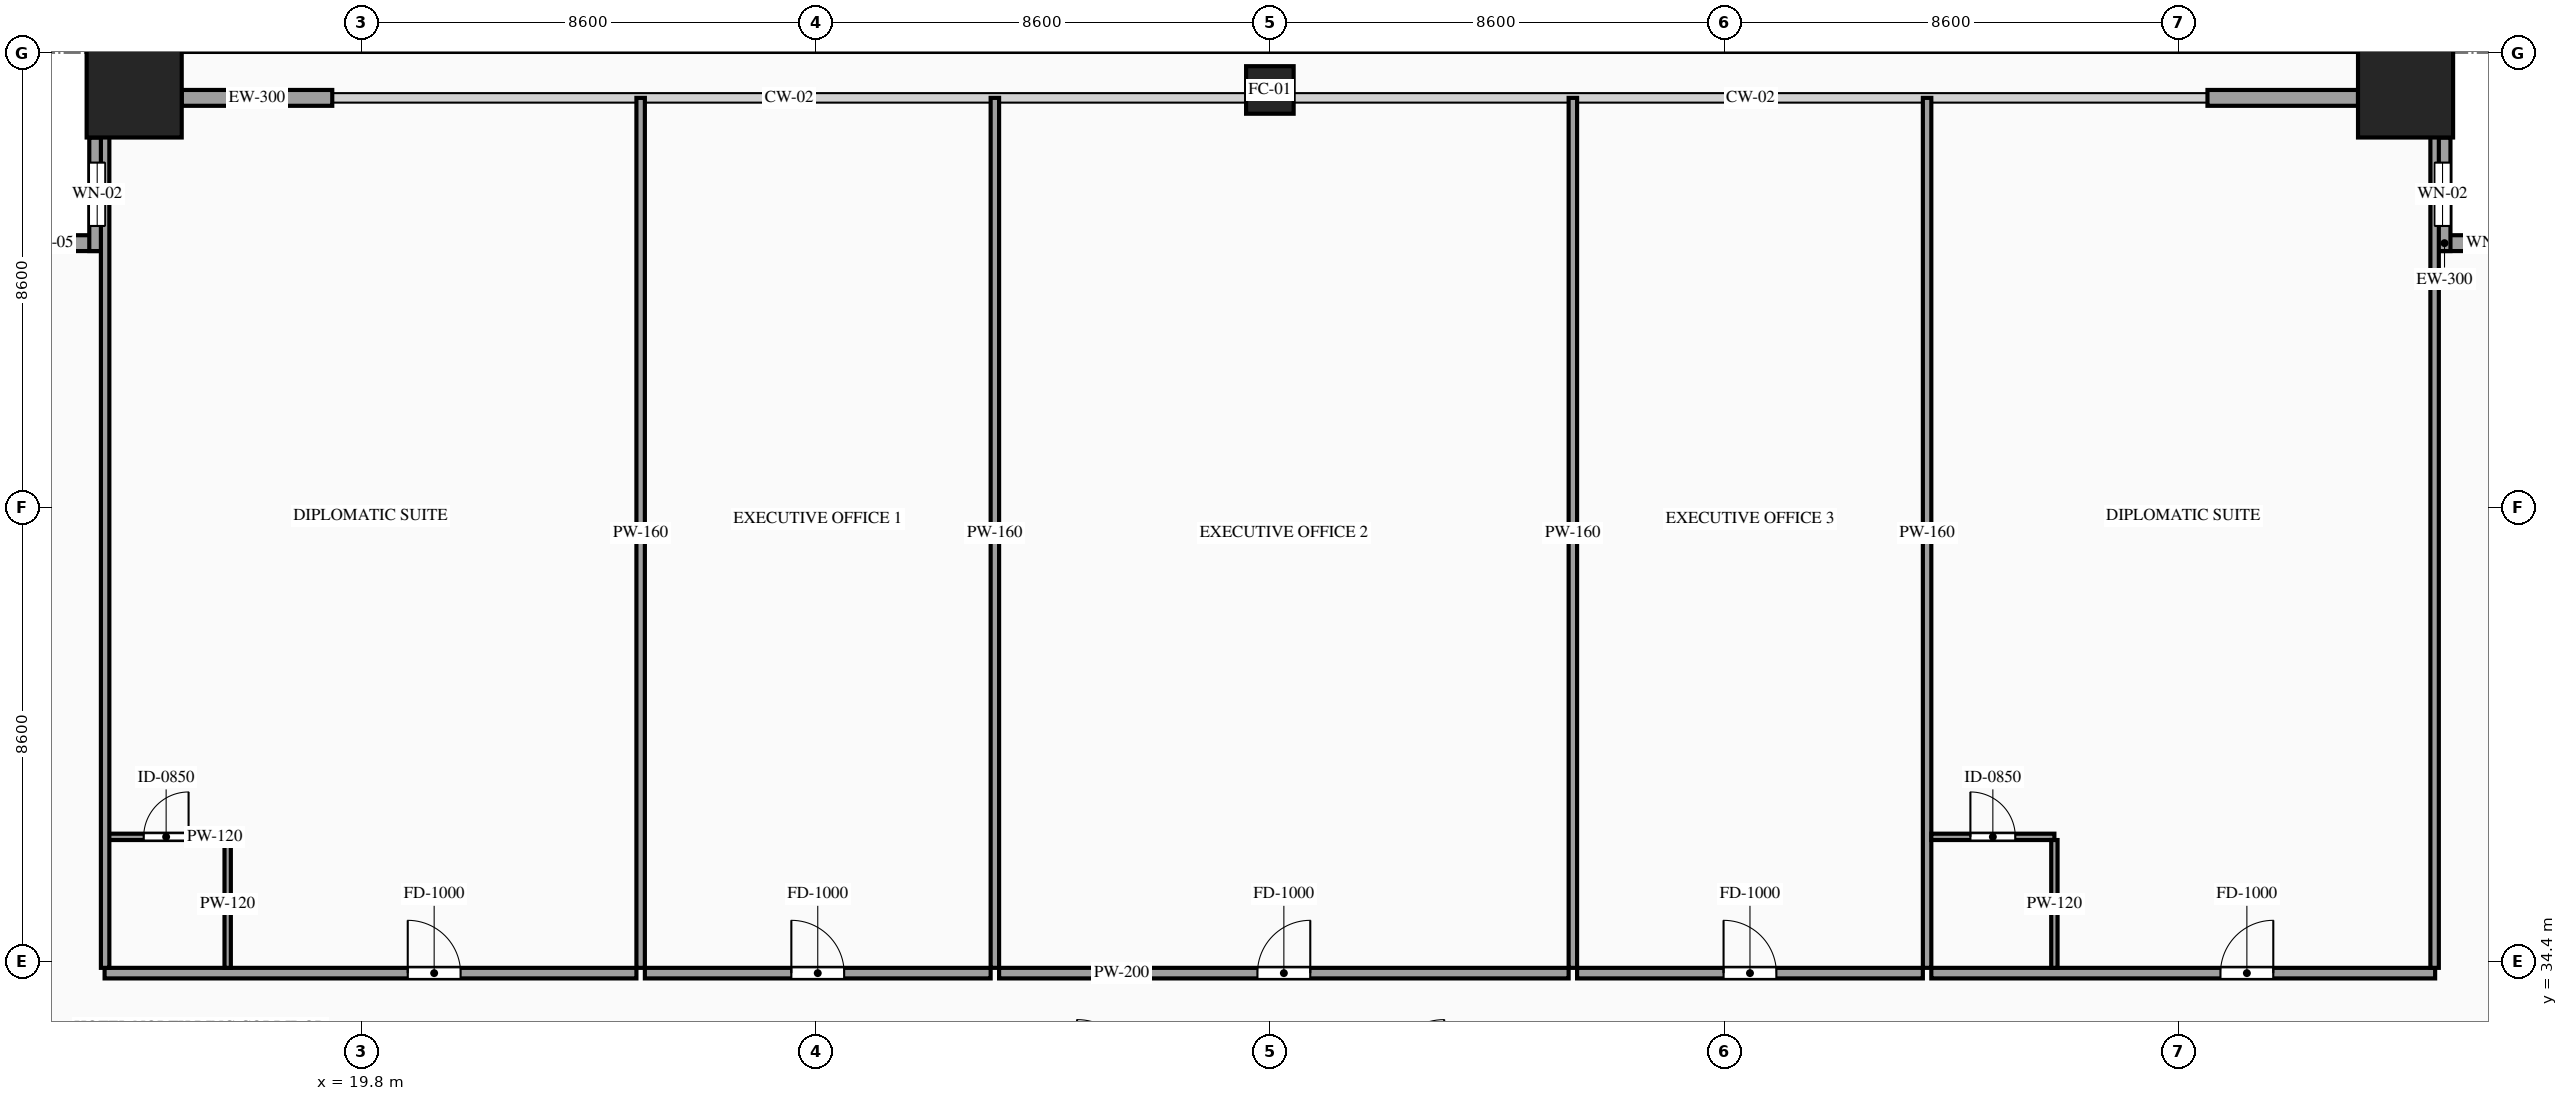
"""IFC4 building model, lengths in metres.
Left out: names, types, materials, properties, quantities, classifications, styles, units other than length and angle.
Written with IfcOpenShell. Run it as: python <this file> out.ifc"""

import sys

from ifc_helpers import new_model, si_unit, direction, frame, frame_2d, origin, origin_2d, place, context, subcontext, project, spatial, rectangle, hollow_rectangle, extrude, source, transform, mapped, element, fill, save


model = new_model("IFC4")
c1 = context("Model", 3, precision=1e-05, world=origin(), true_north=direction((0.0, 1.0)))
c2 = subcontext(c1, "Body", "Model", "MODEL_VIEW")
j1 = project(units=[si_unit("LENGTHUNIT", "METRE"), si_unit("PLANEANGLEUNIT", "RADIAN")], contexts=[c1])
p1 = place(None, origin())
s1 = spatial("IfcSite", under=j1, at=p1, CompositionType="ELEMENT")
p2 = place(p1, origin())
s2 = spatial("IfcBuilding", under=s1, at=p2, CompositionType="ELEMENT")
p3 = place(p2, frame((0.0, 0.0, 56.8)))
s3 = spatial("IfcBuildingStorey", under=s2, at=p3, CompositionType="ELEMENT", Elevation=56.8)
m1 = source(origin(), c2, "Body", "SweptSolid", [
    extrude(hollow_rectangle(XDim=1.8, YDim=1.8, WallThickness=0.08, at=origin_2d()), origin(), (0.0, 0.0, 1.0), 3.6),
])
p4 = place(p3, frame((15.5, 50.9, 0.0), z_axis=(0.0, 0.0, 1.0), x_axis=(1.0, 0.0, 0.0)))
e1 = element("IfcColumn", 1, at=p4, inside=s3, PredefinedType="COLUMN", context=c2, shape_type="MappedRepresentation", body=[
    mapped(m1, transform((0.0, 0.0, 0.0), scale=1.0)),
])
m2 = source(origin(), c2, "Body", "SweptSolid", [
    extrude(hollow_rectangle(XDim=0.9, YDim=0.9, WallThickness=0.042, at=origin_2d()), origin(), (0.0, 0.0, 1.0), 3.6),
])
p5 = place(p3, frame((37.0, 50.9, 0.0), z_axis=(0.0, 0.0, 1.0), x_axis=(1.0, 0.0, 0.0)))
e2 = element("IfcColumn", 2, at=p5, inside=s3, PredefinedType="COLUMN", context=c2, shape_type="MappedRepresentation", body=[
    mapped(m2, transform((0.0, 0.0, 0.0), scale=1.0)),
])
p6 = place(p3, frame((58.5, 50.9, 0.0), z_axis=(0.0, 0.0, 1.0), x_axis=(1.0, 0.0, 0.0)))
e3 = element("IfcColumn", 3, at=p6, inside=s3, PredefinedType="COLUMN", context=c2, shape_type="MappedRepresentation", body=[
    mapped(m1, transform((0.0, 0.0, 0.0), scale=1.0)),
])
p7 = place(p3, frame((14.95, 48.0, 0.0), z_axis=(0.0, 0.0, 1.0), x_axis=(-1.0, 0.0, 0.0)))
e4 = element("IfcWall", 4, at=p7, inside=s3, PredefinedType="SOLIDWALL", context=c2, shape_type="SweptSolid", body=[
    extrude(rectangle(XDim=2.15, YDim=0.3, at=frame_2d((1.075, 0.0))), origin(), (0.0, 0.0, 1.0), 3.38),
])
p8 = place(p7, frame((0.625, 0.0, 0.85)))
e5 = element("IfcOpeningElement", 5, at=p8, cuts=e4, PredefinedType="OPENING", context=c2, shape_type="SweptSolid", body=[
    extrude(rectangle(XDim=0.9, YDim=1.5, at=frame_2d((0.45, 0.75))), frame((0.0, 0.165, 0.0), z_axis=(0.0, -1.0, 0.0), x_axis=(1.0, 0.0, 0.0)), (0.0, 0.0, 1.0), 0.33),
])
p9 = place(p3, frame((14.8, 50.0, 0.0), z_axis=(0.0, 0.0, 1.0), x_axis=(0.0, -1.0, 0.0)))
e6 = element("IfcWall", 6, at=p9, inside=s3, PredefinedType="SOLIDWALL", context=c2, shape_type="SweptSolid", body=[
    extrude(rectangle(XDim=2.15, YDim=0.3, at=frame_2d((1.075, 0.0))), origin(), (0.0, 0.0, 1.0), 3.38),
])
p10 = place(p9, frame((0.475, 0.0, 0.85)))
e7 = element("IfcOpeningElement", 7, at=p10, cuts=e6, PredefinedType="OPENING", context=c2, shape_type="SweptSolid", body=[
    extrude(rectangle(XDim=1.2, YDim=2.1, at=frame_2d((0.6, 1.05))), frame((0.0, 0.165, 0.0), z_axis=(0.0, -1.0, 0.0), x_axis=(1.0, 0.0, 0.0)), (0.0, 0.0, 1.0), 0.33),
])
p11 = place(p3, frame((61.2, 48.0, 0.0), z_axis=(0.0, 0.0, 1.0), x_axis=(-1.0, 0.0, 0.0)))
e8 = element("IfcWall", 8, at=p11, inside=s3, PredefinedType="SOLIDWALL", context=c2, shape_type="SweptSolid", body=[
    extrude(rectangle(XDim=2.15, YDim=0.3, at=frame_2d((1.075, 0.0))), origin(), (0.0, 0.0, 1.0), 3.38),
])
p12 = place(p11, frame((0.625, 0.0, 0.85)))
e9 = element("IfcOpeningElement", 9, at=p12, cuts=e8, PredefinedType="OPENING", context=c2, shape_type="SweptSolid", body=[
    extrude(rectangle(XDim=0.9, YDim=1.5, at=frame_2d((0.45, 0.75))), frame((0.0, 0.165, 0.0), z_axis=(0.0, -1.0, 0.0), x_axis=(1.0, 0.0, 0.0)), (0.0, 0.0, 1.0), 0.33),
])
p13 = place(p3, frame((59.2, 47.85, 0.0), z_axis=(0.0, 0.0, 1.0), x_axis=(0.0, 1.0, 0.0)))
e10 = element("IfcWall", 10, at=p13, inside=s3, PredefinedType="SOLIDWALL", context=c2, shape_type="SweptSolid", body=[
    extrude(rectangle(XDim=2.15, YDim=0.3, at=frame_2d((1.075, 0.0))), origin(), (0.0, 0.0, 1.0), 3.38),
])
p14 = place(p13, frame((0.475, 0.0, 0.85)))
e11 = element("IfcOpeningElement", 11, at=p14, cuts=e10, PredefinedType="OPENING", context=c2, shape_type="SweptSolid", body=[
    extrude(rectangle(XDim=1.2, YDim=2.1, at=frame_2d((0.6, 1.05))), frame((0.0, 0.165, 0.0), z_axis=(0.0, -1.0, 0.0), x_axis=(1.0, 0.0, 0.0)), (0.0, 0.0, 1.0), 0.33),
])
m3 = source(origin(), c2, "Body", "SweptSolid", [
    extrude(rectangle(XDim=2.85, YDim=0.3, at=frame_2d((1.425, 0.0))), origin(), (0.0, 0.0, 1.0), 2.775),
])
for number, where, z_axis, x_axis in (
    (12, (16.4, 50.75, 0.0), (0.0, 0.0, 1.0), (1.0, 0.0, 0.0)),
    (13, (54.75, 50.75, 0.0), (0.0, 0.0, 1.0), (1.0, 0.0, 0.0)),
):
    element("IfcWall", number, at=place(p3, frame(where, z_axis=z_axis, x_axis=x_axis)), inside=s3, PredefinedType="SOLIDWALL", context=c2, shape_type="MappedRepresentation", body=[
        mapped(m3, transform((0.0, 0.0, 0.0), scale=1.0)),
    ])
p15 = place(p3, frame((14.94, 34.18, 0.0), z_axis=(0.0, 0.0, 1.0), x_axis=(1.0, 0.0, 0.0)))
e14 = element("IfcWall", 14, at=p15, inside=s3, PredefinedType="PARTITIONING", context=c2, shape_type="SweptSolid", body=[
    extrude(rectangle(XDim=10.068, YDim=0.2, at=frame_2d((5.034, 0.0))), origin(), (0.0, 0.0, 1.0), 3.38),
])
p16 = place(p15, frame((5.739, 0.0, 0.0)))
e15 = element("IfcOpeningElement", 15, at=p16, cuts=e14, PredefinedType="OPENING", context=c2, shape_type="SweptSolid", body=[
    extrude(rectangle(XDim=1.0, YDim=2.2, at=frame_2d((0.5, 1.1))), frame((0.0, 0.115, 0.0), z_axis=(0.0, -1.0, 0.0), x_axis=(1.0, 0.0, 0.0)), (0.0, 0.0, 1.0), 0.23),
])
m4 = source(origin(), c2, "Body", "SweptSolid", [
    extrude(rectangle(XDim=16.47, YDim=0.16, at=frame_2d((8.235, 0.0))), origin(), (0.0, 0.0, 1.0), 3.38),
])
p17 = place(p3, frame((25.088, 34.28, 0.0), z_axis=(0.0, 0.0, 1.0), x_axis=(0.0, 1.0, 0.0)))
e16 = element("IfcWall", 16, at=p17, inside=s3, PredefinedType="PARTITIONING", context=c2, shape_type="MappedRepresentation", body=[
    mapped(m4, transform((0.0, 0.0, 0.0), scale=1.0)),
])
p18 = place(p3, frame((14.94, 36.76, 0.0), z_axis=(0.0, 0.0, 1.0), x_axis=(1.0, 0.0, 0.0)))
e17 = element("IfcWall", 17, at=p18, inside=s3, PredefinedType="PARTITIONING", context=c2, shape_type="SweptSolid", body=[
    extrude(rectangle(XDim=2.33, YDim=0.12, at=frame_2d((1.165, 0.0))), origin(), (0.0, 0.0, 1.0), 3.38),
])
p19 = place(p18, frame((0.74, 0.0, 0.0)))
e18 = element("IfcOpeningElement", 18, at=p19, cuts=e17, PredefinedType="OPENING", context=c2, shape_type="SweptSolid", body=[
    extrude(rectangle(XDim=0.85, YDim=2.1, at=frame_2d((0.425, 1.05))), frame((0.0, 0.075, 0.0), z_axis=(0.0, -1.0, 0.0), x_axis=(1.0, 0.0, 0.0)), (0.0, 0.0, 1.0), 0.15),
])
m5 = source(origin(), c2, "Body", "SweptSolid", [
    extrude(rectangle(XDim=2.42, YDim=0.12, at=frame_2d((1.21, 0.0))), origin(), (0.0, 0.0, 1.0), 3.38),
])
p20 = place(p3, frame((17.27, 34.28, 0.0), z_axis=(0.0, 0.0, 1.0), x_axis=(0.0, 1.0, 0.0)))
e19 = element("IfcWall", 19, at=p20, inside=s3, PredefinedType="PARTITIONING", context=c2, shape_type="MappedRepresentation", body=[
    mapped(m5, transform((0.0, 0.0, 0.0), scale=1.0)),
])
p21 = place(p3, frame((25.168, 34.18, 0.0), z_axis=(0.0, 0.0, 1.0), x_axis=(1.0, 0.0, 0.0)))
e20 = element("IfcWall", 20, at=p21, inside=s3, PredefinedType="PARTITIONING", context=c2, shape_type="SweptSolid", body=[
    extrude(rectangle(XDim=6.546, YDim=0.2, at=frame_2d((3.273, 0.0))), origin(), (0.0, 0.0, 1.0), 3.38),
])
p22 = place(p21, frame((2.773, 0.0, 0.0)))
e21 = element("IfcOpeningElement", 21, at=p22, cuts=e20, PredefinedType="OPENING", context=c2, shape_type="SweptSolid", body=[
    extrude(rectangle(XDim=1.0, YDim=2.2, at=frame_2d((0.5, 1.1))), frame((0.0, 0.115, 0.0), z_axis=(0.0, -1.0, 0.0), x_axis=(1.0, 0.0, 0.0)), (0.0, 0.0, 1.0), 0.23),
])
p23 = place(p3, frame((31.794, 34.28, 0.0), z_axis=(0.0, 0.0, 1.0), x_axis=(0.0, 1.0, 0.0)))
e22 = element("IfcWall", 22, at=p23, inside=s3, PredefinedType="PARTITIONING", context=c2, shape_type="MappedRepresentation", body=[
    mapped(m4, transform((0.0, 0.0, 0.0), scale=1.0)),
])
p24 = place(p3, frame((31.874, 34.18, 0.0), z_axis=(0.0, 0.0, 1.0), x_axis=(1.0, 0.0, 0.0)))
e23 = element("IfcWall", 23, at=p24, inside=s3, PredefinedType="PARTITIONING", context=c2, shape_type="SweptSolid", body=[
    extrude(rectangle(XDim=10.782, YDim=0.2, at=frame_2d((5.391, 0.0))), origin(), (0.0, 0.0, 1.0), 3.38),
])
p25 = place(p24, frame((4.891, 0.0, 0.0)))
e24 = element("IfcOpeningElement", 24, at=p25, cuts=e23, PredefinedType="OPENING", context=c2, shape_type="SweptSolid", body=[
    extrude(rectangle(XDim=1.0, YDim=2.2, at=frame_2d((0.5, 1.1))), frame((0.0, 0.115, 0.0), z_axis=(0.0, -1.0, 0.0), x_axis=(1.0, 0.0, 0.0)), (0.0, 0.0, 1.0), 0.23),
])
p26 = place(p3, frame((42.736, 34.28, 0.0), z_axis=(0.0, 0.0, 1.0), x_axis=(0.0, 1.0, 0.0)))
e25 = element("IfcWall", 25, at=p26, inside=s3, PredefinedType="PARTITIONING", context=c2, shape_type="MappedRepresentation", body=[
    mapped(m4, transform((0.0, 0.0, 0.0), scale=1.0)),
])
p27 = place(p3, frame((42.816, 34.18, 0.0), z_axis=(0.0, 0.0, 1.0), x_axis=(1.0, 0.0, 0.0)))
e26 = element("IfcWall", 26, at=p27, inside=s3, PredefinedType="PARTITIONING", context=c2, shape_type="SweptSolid", body=[
    extrude(rectangle(XDim=6.546, YDim=0.2, at=frame_2d((3.273, 0.0))), origin(), (0.0, 0.0, 1.0), 3.38),
])
p28 = place(p27, frame((2.773, 0.0, 0.0)))
e27 = element("IfcOpeningElement", 27, at=p28, cuts=e26, PredefinedType="OPENING", context=c2, shape_type="SweptSolid", body=[
    extrude(rectangle(XDim=1.0, YDim=2.2, at=frame_2d((0.5, 1.1))), frame((0.0, 0.115, 0.0), z_axis=(0.0, -1.0, 0.0), x_axis=(1.0, 0.0, 0.0)), (0.0, 0.0, 1.0), 0.23),
])
p29 = place(p3, frame((49.442, 34.28, 0.0), z_axis=(0.0, 0.0, 1.0), x_axis=(0.0, 1.0, 0.0)))
e28 = element("IfcWall", 28, at=p29, inside=s3, PredefinedType="PARTITIONING", context=c2, shape_type="MappedRepresentation", body=[
    mapped(m4, transform((0.0, 0.0, 0.0), scale=1.0)),
])
p30 = place(p3, frame((49.522, 34.18, 0.0), z_axis=(0.0, 0.0, 1.0), x_axis=(1.0, 0.0, 0.0)))
e29 = element("IfcWall", 29, at=p30, inside=s3, PredefinedType="PARTITIONING", context=c2, shape_type="SweptSolid", body=[
    extrude(rectangle(XDim=9.538, YDim=0.2, at=frame_2d((4.769, 0.0))), origin(), (0.0, 0.0, 1.0), 3.38),
])
p31 = place(p30, frame((5.474, 0.0, 0.0)))
e30 = element("IfcOpeningElement", 30, at=p31, cuts=e29, PredefinedType="OPENING", context=c2, shape_type="SweptSolid", body=[
    extrude(rectangle(XDim=1.0, YDim=2.2, at=frame_2d((0.5, 1.1))), frame((0.0, 0.115, 0.0), z_axis=(0.0, -1.0, 0.0), x_axis=(1.0, 0.0, 0.0)), (0.0, 0.0, 1.0), 0.23),
])
m6 = source(origin(), c2, "Body", "SweptSolid", [
    extrude(rectangle(XDim=16.32, YDim=0.16, at=frame_2d((8.16, 0.0))), origin(), (0.0, 0.0, 1.0), 3.38),
])
for number, where, z_axis, x_axis in (
    (31, (14.95, 34.28, 0.0), (0.0, 0.0, 1.0), (0.0, 1.0, 0.0)),
    (32, (59.05, 34.28, 0.0), (0.0, 0.0, 1.0), (0.0, 1.0, 0.0)),
):
    element("IfcWall", number, at=place(p3, frame(where, z_axis=z_axis, x_axis=x_axis)), inside=s3, PredefinedType="PARTITIONING", context=c2, shape_type="MappedRepresentation", body=[
        mapped(m6, transform((0.0, 0.0, 0.0), scale=1.0)),
    ])
p32 = place(p3, frame((49.522, 36.76, 0.0), z_axis=(0.0, 0.0, 1.0), x_axis=(1.0, 0.0, 0.0)))
e33 = element("IfcWall", 33, at=p32, inside=s3, PredefinedType="PARTITIONING", context=c2, shape_type="SweptSolid", body=[
    extrude(rectangle(XDim=2.33, YDim=0.12, at=frame_2d((1.165, 0.0))), origin(), (0.0, 0.0, 1.0), 3.38),
])
p33 = place(p32, frame((0.74, 0.0, 0.0)))
e34 = element("IfcOpeningElement", 34, at=p33, cuts=e33, PredefinedType="OPENING", context=c2, shape_type="SweptSolid", body=[
    extrude(rectangle(XDim=0.85, YDim=2.1, at=frame_2d((0.425, 1.05))), frame((0.0, 0.075, 0.0), z_axis=(0.0, -1.0, 0.0), x_axis=(1.0, 0.0, 0.0)), (0.0, 0.0, 1.0), 0.15),
])
p34 = place(p3, frame((51.852, 34.28, 0.0), z_axis=(0.0, 0.0, 1.0), x_axis=(0.0, 1.0, 0.0)))
e35 = element("IfcWall", 35, at=p34, inside=s3, PredefinedType="PARTITIONING", context=c2, shape_type="MappedRepresentation", body=[
    mapped(m5, transform((0.0, 0.0, 0.0), scale=1.0)),
])
m7 = source(origin(), c2, "Body", "SweptSolid", [
    extrude(rectangle(XDim=0.9, YDim=1.5, at=frame_2d((0.45, 0.75))), frame((0.0, 0.03, 0.0), z_axis=(0.0, -1.0, 0.0), x_axis=(1.0, 0.0, 0.0)), (0.0, 0.0, 1.0), 0.06),
])
p35 = place(p8, origin())
e36 = element("IfcWindow", 36, at=p35, inside=s3, PartitioningType="SINGLE_PANEL", PredefinedType="WINDOW", context=c2, shape_type="MappedRepresentation", body=[
    mapped(m7, transform((0.0, 0.0, 0.0), scale=1.0)),
])
fill(e5, e36)
m8 = source(origin(), c2, "Body", "SweptSolid", [
    extrude(rectangle(XDim=1.2, YDim=2.1, at=frame_2d((0.6, 1.05))), frame((0.0, 0.03, 0.0), z_axis=(0.0, -1.0, 0.0), x_axis=(1.0, 0.0, 0.0)), (0.0, 0.0, 1.0), 0.06),
])
p36 = place(p10, origin())
e37 = element("IfcWindow", 37, at=p36, inside=s3, PartitioningType="SINGLE_PANEL", PredefinedType="WINDOW", context=c2, shape_type="MappedRepresentation", body=[
    mapped(m8, transform((0.0, 0.0, 0.0), scale=1.0)),
])
fill(e7, e37)
p37 = place(p12, origin())
e38 = element("IfcWindow", 38, at=p37, inside=s3, PartitioningType="SINGLE_PANEL", PredefinedType="WINDOW", context=c2, shape_type="MappedRepresentation", body=[
    mapped(m7, transform((0.0, 0.0, 0.0), scale=1.0)),
])
fill(e9, e38)
p38 = place(p14, origin())
e39 = element("IfcWindow", 39, at=p38, inside=s3, PartitioningType="SINGLE_PANEL", PredefinedType="WINDOW", context=c2, shape_type="MappedRepresentation", body=[
    mapped(m8, transform((0.0, 0.0, 0.0), scale=1.0)),
])
fill(e11, e39)
m9 = source(origin(), c2, "Body", "SweptSolid", [
    extrude(rectangle(XDim=1.0, YDim=2.2, at=frame_2d((0.5, 1.1))), frame((0.0, 0.025, 0.0), z_axis=(0.0, -1.0, 0.0), x_axis=(1.0, 0.0, 0.0)), (0.0, 0.0, 1.0), 0.05),
])
p39 = place(p16, origin())
e40 = element("IfcDoor", 40, at=p39, inside=s3, OperationType="SINGLE_SWING_LEFT", PredefinedType="DOOR", context=c2, shape_type="MappedRepresentation", body=[
    mapped(m9, transform((0.0, 0.0, 0.0), scale=1.0)),
])
fill(e15, e40)
m10 = source(origin(), c2, "Body", "SweptSolid", [
    extrude(rectangle(XDim=0.85, YDim=2.1, at=frame_2d((0.425, 1.05))), frame((0.0, 0.025, 0.0), z_axis=(0.0, -1.0, 0.0), x_axis=(1.0, 0.0, 0.0)), (0.0, 0.0, 1.0), 0.05),
])
p40 = place(p19, origin())
e41 = element("IfcDoor", 41, at=p40, inside=s3, OperationType="SINGLE_SWING_RIGHT", PredefinedType="DOOR", context=c2, shape_type="MappedRepresentation", body=[
    mapped(m10, transform((0.0, 0.0, 0.0), scale=1.0)),
])
fill(e18, e41)
p41 = place(p22, origin())
e42 = element("IfcDoor", 42, at=p41, inside=s3, OperationType="SINGLE_SWING_LEFT", PredefinedType="DOOR", context=c2, shape_type="MappedRepresentation", body=[
    mapped(m9, transform((0.0, 0.0, 0.0), scale=1.0)),
])
fill(e21, e42)
p42 = place(p25, origin())
e43 = element("IfcDoor", 43, at=p42, inside=s3, OperationType="SINGLE_SWING_RIGHT", PredefinedType="DOOR", context=c2, shape_type="MappedRepresentation", body=[
    mapped(m9, transform((0.0, 0.0, 0.0), scale=1.0)),
])
fill(e24, e43)
p43 = place(p28, origin())
e44 = element("IfcDoor", 44, at=p43, inside=s3, OperationType="SINGLE_SWING_LEFT", PredefinedType="DOOR", context=c2, shape_type="MappedRepresentation", body=[
    mapped(m9, transform((0.0, 0.0, 0.0), scale=1.0)),
])
fill(e27, e44)
p44 = place(p31, origin())
e45 = element("IfcDoor", 45, at=p44, inside=s3, OperationType="SINGLE_SWING_RIGHT", PredefinedType="DOOR", context=c2, shape_type="MappedRepresentation", body=[
    mapped(m9, transform((0.0, 0.0, 0.0), scale=1.0)),
])
fill(e30, e45)
p45 = place(p33, origin())
e46 = element("IfcDoor", 46, at=p45, inside=s3, OperationType="SINGLE_SWING_LEFT", PredefinedType="DOOR", context=c2, shape_type="MappedRepresentation", body=[
    mapped(m10, transform((0.0, 0.0, 0.0), scale=1.0)),
])
fill(e34, e46)
save(model, sys.argv[1])
